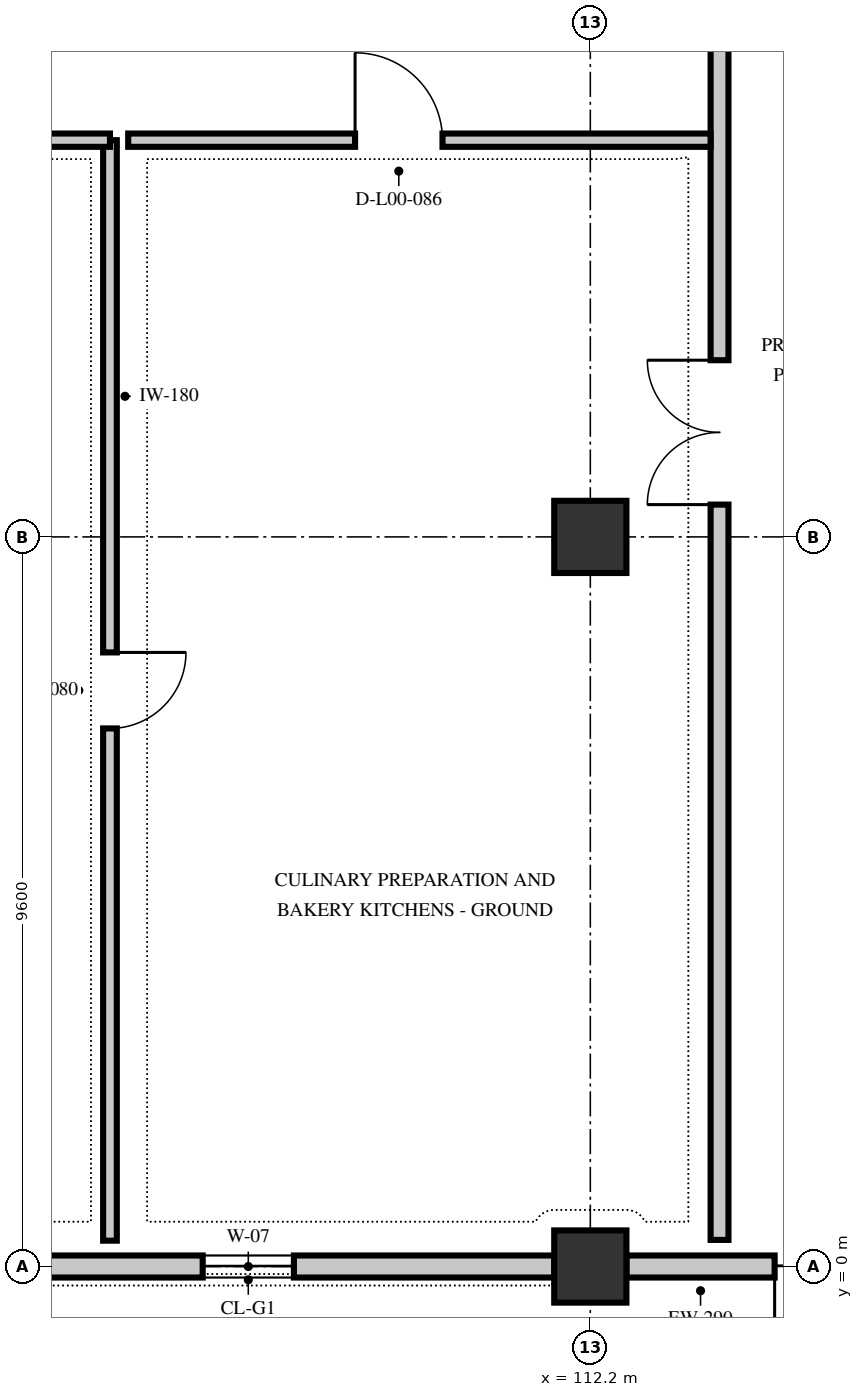
"""IFC4 building model, lengths in metres.
Left out: names, types, materials, properties, quantities, classifications, styles, units other than length and angle.
Written with IfcOpenShell. Run it as: python <this file> out.ifc"""

import sys

from ifc_helpers import new_model, si_unit, direction, frame, frame_2d, origin, origin_2d, place, context, subcontext, project, spatial, rectangle, extrude, element, fill, save


model = new_model("IFC4")
c1 = context("Model", 3, precision=1e-05, world=origin(), true_north=direction((0.0, 1.0)))
c2 = subcontext(c1, "Body", "Model", "MODEL_VIEW")
j1 = project(units=[si_unit("LENGTHUNIT", "METRE"), si_unit("PLANEANGLEUNIT", "RADIAN")], contexts=[c1])
p1 = place(None, origin())
s1 = spatial("IfcSite", under=j1, at=p1, CompositionType="ELEMENT")
p2 = place(p1, origin())
s2 = spatial("IfcBuilding", under=s1, at=p2, CompositionType="ELEMENT")
p3 = place(p2, origin())
s3 = spatial("IfcBuildingStorey", under=s2, at=p3, CompositionType="ELEMENT", Elevation=0.0)
for number, where, z_axis, x_axis in (
    (1, (112.2, 0.0, -0.3), (0.0, 0.0, 1.0), (1.0, 0.0, 0.0)),
    (2, (112.2, 9.6, -0.3), (0.0, 0.0, 1.0), (1.0, 0.0, 0.0)),
):
    element("IfcColumn", number, at=place(p3, frame(where, z_axis=z_axis, x_axis=x_axis)), inside=s3, PredefinedType="COLUMN", context=c2, shape_type="SweptSolid", body=[
        extrude(rectangle(XDim=0.95, YDim=0.95, at=origin_2d()), origin(), (0.0, 0.0, 1.0), 5.7),
    ])
p4 = place(p3, frame((120.725, 0.0, 0.0), z_axis=(0.0, 0.0, 1.0), x_axis=(-1.0, 0.0, 0.0)))
e3 = element("IfcWall", 3, at=p4, inside=s3, PredefinedType="SOLIDWALL", context=c2, shape_type="SweptSolid", body=[
    extrude(rectangle(XDim=8.05, YDim=0.29, at=frame_2d((4.025, 0.0))), origin(), (0.0, 0.0, 1.0), 5.09),
])
p5 = place(p4, frame((3.95, 0.0, 0.0)))
e4 = element("IfcOpeningElement", 4, at=p5, cuts=e3, PredefinedType="OPENING", context=c2, shape_type="SweptSolid", body=[
    extrude(rectangle(XDim=2.15, YDim=2.3, at=frame_2d((1.075, 1.15))), frame((0.0, 0.157, 0.0), z_axis=(0.0, -1.0, 0.0), x_axis=(1.0, 0.0, 0.0)), (0.0, 0.0, 1.0), 0.314),
])
p6 = place(p3, frame((111.727, 0.0, 0.0), z_axis=(0.0, 0.0, 1.0), x_axis=(-1.0, 0.0, 0.0)))
e5 = element("IfcWall", 5, at=p6, inside=s3, PredefinedType="SOLIDWALL", context=c2, shape_type="SweptSolid", body=[
    extrude(rectangle(XDim=8.054, YDim=0.29, at=frame_2d((4.027, 0.0))), origin(), (0.0, 0.0, 1.0), 5.09),
])
p7 = place(p6, frame((3.427, 0.0, 1.05)))
e6 = element("IfcOpeningElement", 6, at=p7, cuts=e5, PredefinedType="OPENING", context=c2, shape_type="SweptSolid", body=[
    extrude(rectangle(XDim=1.2, YDim=2.0, at=frame_2d((0.6, 1.0))), frame((0.0, 0.157, 0.0), z_axis=(0.0, -1.0, 0.0), x_axis=(1.0, 0.0, 0.0)), (0.0, 0.0, 1.0), 0.314),
])
p8 = place(p3, frame((113.9, 0.35, 0.0), z_axis=(0.0, 0.0, 1.0), x_axis=(0.0, 1.0, 0.0)))
e7 = element("IfcWall", 7, at=p8, inside=s3, PredefinedType="PARTITIONING", context=c2, shape_type="SweptSolid", body=[
    extrude(rectangle(XDim=19.25, YDim=0.235, at=frame_2d((9.625, 0.0))), origin(), (0.0, 0.0, 1.0), 4.03),
])
p9 = place(p8, frame((9.675, 0.0, 0.0)))
e8 = element("IfcOpeningElement", 8, at=p9, cuts=e7, PredefinedType="OPENING", context=c2, shape_type="SweptSolid", body=[
    extrude(rectangle(XDim=1.9, YDim=2.25, at=frame_2d((0.95, 1.125))), frame((0.0, 0.129, 0.0), z_axis=(0.0, -1.0, 0.0), x_axis=(1.0, 0.0, 0.0)), (0.0, 0.0, 1.0), 0.259),
])
p10 = place(p3, frame((105.88, 14.82, 0.0), z_axis=(0.0, 0.0, 1.0), x_axis=(0.0, -1.0, 0.0)))
e9 = element("IfcWall", 9, at=p10, inside=s3, PredefinedType="PARTITIONING", context=c2, shape_type="SweptSolid", body=[
    extrude(rectangle(XDim=14.48, YDim=0.18, at=frame_2d((7.24, 0.0))), origin(), (0.0, 0.0, 1.0), 4.03),
])
p11 = place(p10, frame((6.74, 0.0, 0.0)))
e10 = element("IfcOpeningElement", 10, at=p11, cuts=e9, PredefinedType="OPENING", context=c2, shape_type="SweptSolid", body=[
    extrude(rectangle(XDim=1.0, YDim=2.2, at=frame_2d((0.5, 1.1))), frame((0.0, 0.102, 0.0), z_axis=(0.0, -1.0, 0.0), x_axis=(1.0, 0.0, 0.0)), (0.0, 0.0, 1.0), 0.204),
])
p12 = place(p3, frame((91.84, 14.82, 0.0), z_axis=(0.0, 0.0, 1.0), x_axis=(1.0, 0.0, 0.0)))
e11 = element("IfcWall", 11, at=p12, inside=s3, PredefinedType="PARTITIONING", context=c2, shape_type="SweptSolid", body=[
    extrude(rectangle(XDim=14.04, YDim=0.175, at=frame_2d((7.02, 0.0))), origin(), (0.0, 0.0, 1.0), 4.03),
])
p13 = place(p3, frame((106.12, 14.82, 0.0), z_axis=(0.0, 0.0, 1.0), x_axis=(1.0, 0.0, 0.0)))
e12 = element("IfcWall", 12, at=p13, inside=s3, PredefinedType="PARTITIONING", context=c2, shape_type="SweptSolid", body=[
    extrude(rectangle(XDim=7.662, YDim=0.175, at=frame_2d((3.831, 0.0))), origin(), (0.0, 0.0, 1.0), 4.03),
])
p14 = place(p13, frame((2.985, 0.0, 0.0)))
e13 = element("IfcOpeningElement", 13, at=p14, cuts=e12, PredefinedType="OPENING", context=c2, shape_type="SweptSolid", body=[
    extrude(rectangle(XDim=1.15, YDim=2.2, at=frame_2d((0.575, 1.1))), frame((0.0, 0.1, 0.0), z_axis=(0.0, -1.0, 0.0), x_axis=(1.0, 0.0, 0.0)), (0.0, 0.0, 1.0), 0.199),
])
p15 = place(p5, origin())
e14 = element("IfcDoor", 14, at=p15, inside=s3, OperationType="DOUBLE_DOOR_SINGLE_SWING", PredefinedType="DOOR", context=c2, shape_type="SweptSolid", body=[
    extrude(rectangle(XDim=2.15, YDim=2.3, at=frame_2d((1.075, 1.15))), frame((0.0, 0.025, 0.0), z_axis=(0.0, -1.0, 0.0), x_axis=(1.0, 0.0, 0.0)), (0.0, 0.0, 1.0), 0.05),
])
fill(e4, e14)
p16 = place(p7, origin())
e15 = element("IfcWindow", 15, at=p16, inside=s3, PartitioningType="SINGLE_PANEL", PredefinedType="WINDOW", context=c2, shape_type="SweptSolid", body=[
    extrude(rectangle(XDim=1.2, YDim=2.0, at=frame_2d((0.6, 1.0))), frame((0.0, 0.03, 0.0), z_axis=(0.0, -1.0, 0.0), x_axis=(1.0, 0.0, 0.0)), (0.0, 0.0, 1.0), 0.06),
])
fill(e6, e15)
p17 = place(p9, origin())
e16 = element("IfcDoor", 16, at=p17, inside=s3, OperationType="DOUBLE_DOOR_SINGLE_SWING", PredefinedType="DOOR", context=c2, shape_type="SweptSolid", body=[
    extrude(rectangle(XDim=1.9, YDim=2.25, at=frame_2d((0.95, 1.125))), frame((0.0, 0.025, 0.0), z_axis=(0.0, -1.0, 0.0), x_axis=(1.0, 0.0, 0.0)), (0.0, 0.0, 1.0), 0.05),
])
fill(e8, e16)
p18 = place(p11, origin())
e17 = element("IfcDoor", 17, at=p18, inside=s3, OperationType="SINGLE_SWING_LEFT", PredefinedType="DOOR", context=c2, shape_type="SweptSolid", body=[
    extrude(rectangle(XDim=1.0, YDim=2.2, at=frame_2d((0.5, 1.1))), frame((0.0, 0.025, 0.0), z_axis=(0.0, -1.0, 0.0), x_axis=(1.0, 0.0, 0.0)), (0.0, 0.0, 1.0), 0.05),
])
fill(e10, e17)
p19 = place(p14, origin())
e18 = element("IfcDoor", 18, at=p19, inside=s3, OperationType="SINGLE_SWING_LEFT", PredefinedType="DOOR", context=c2, shape_type="SweptSolid", body=[
    extrude(rectangle(XDim=1.15, YDim=2.2, at=frame_2d((0.575, 1.1))), frame((0.0, 0.025, 0.0), z_axis=(0.0, -1.0, 0.0), x_axis=(1.0, 0.0, 0.0)), (0.0, 0.0, 1.0), 0.05),
])
fill(e13, e18)
save(model, sys.argv[1])
